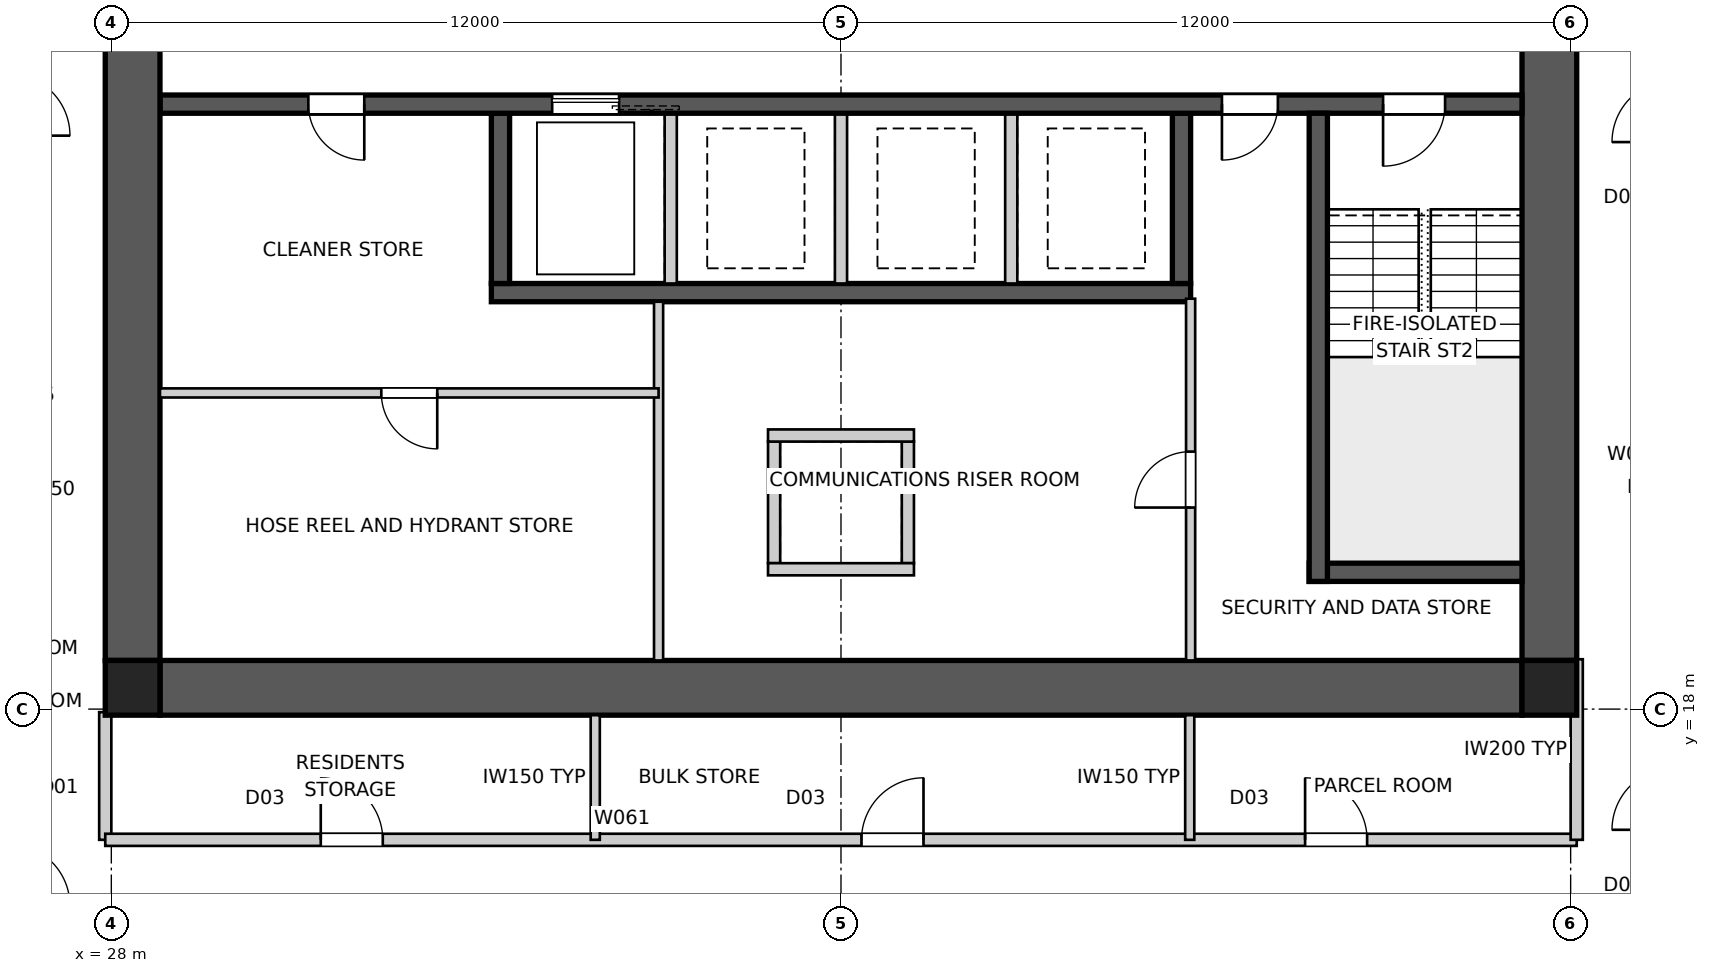
"""IFC4 building model, lengths in metres.
Left out: names, types, materials, properties, quantities, classifications, styles, units other than length and angle.
Written with IfcOpenShell. Run it as: python <this file> out.ifc"""

import sys

from ifc_helpers import new_model, si_unit, direction, frame, frame_2d, origin, origin_2d, place, context, subcontext, project, spatial, polyline, rectangle, outline, extrude, element, fill, save


model = new_model("IFC4")
c1 = context("Model", 3, precision=1e-05, world=origin(), true_north=direction((0.0, 1.0)))
c2 = subcontext(c1, "Body", "Model", "MODEL_VIEW")
j1 = project(units=[si_unit("LENGTHUNIT", "METRE"), si_unit("PLANEANGLEUNIT", "RADIAN")], contexts=[c1])
p1 = place(None, origin())
s1 = spatial("IfcSite", under=j1, at=p1, CompositionType="ELEMENT")
p2 = place(p1, origin())
s2 = spatial("IfcBuilding", under=s1, at=p2, CompositionType="ELEMENT")
p3 = place(p2, frame((0.0, 0.0, 25.2)))
s3 = spatial("IfcBuildingStorey", under=s2, at=p3, CompositionType="ELEMENT", Elevation=25.2)
p4 = place(p3, frame((51.2, 18.35, 0.0), z_axis=(0.0, 0.0, 1.0), x_axis=(-1.0, 0.0, 0.0)))
e1 = element("IfcWall", 1, at=p4, inside=s3, PredefinedType="SHEAR", context=c2, shape_type="SweptSolid", body=[
    extrude(outline(polyline([(0.0, -0.45), (22.4, -0.45), (22.4, -0.025), (22.85, -0.025), (22.85, 0.025), (22.4, 0.025), (22.4, 0.45), (0.0, 0.45), (0.0, 0.025), (-0.45, 0.025), (-0.45, -0.025), (0.0, -0.025), (0.0, -0.45)])), origin(), (0.0, 0.0, 1.0), 3.4),
])
p5 = place(p3, frame((51.65, 18.8, 0.0), z_axis=(0.0, 0.0, 1.0), x_axis=(0.0, 1.0, 0.0)))
e2 = element("IfcWall", 2, at=p5, inside=s3, PredefinedType="SHEAR", context=c2, shape_type="SweptSolid", body=[
    extrude(outline(polyline([(0.0, -0.45), (22.4, -0.45), (22.4, -0.025), (22.85, -0.025), (22.85, 0.025), (22.4, 0.025), (22.4, 0.45), (0.0, 0.45), (0.0, 0.025), (-0.45, 0.025), (-0.45, -0.025), (0.0, -0.025), (0.0, -0.45)])), origin(), (0.0, 0.0, 1.0), 3.4),
])
p6 = place(p5, frame((11.14, 0.0, 0.0)))
e3 = element("IfcOpeningElement", 3, at=p6, cuts=e2, PredefinedType="OPENING", context=c2, shape_type="SweptSolid", body=[
    extrude(rectangle(XDim=1.02, YDim=2.4, at=frame_2d((0.51, 1.2))), frame((0.0, 0.46, 0.0), z_axis=(0.0, -1.0, 0.0), x_axis=(1.0, 0.0, 0.0)), (0.0, 0.0, 1.0), 0.92),
])
p7 = place(p3, frame((28.35, 41.2, 0.0), z_axis=(0.0, 0.0, 1.0), x_axis=(0.0, -1.0, 0.0)))
e4 = element("IfcWall", 4, at=p7, inside=s3, PredefinedType="SHEAR", context=c2, shape_type="SweptSolid", body=[
    extrude(outline(polyline([(0.0, -0.45), (22.4, -0.45), (22.4, -0.025), (22.85, -0.025), (22.85, 0.025), (22.4, 0.025), (22.4, 0.45), (0.0, 0.45), (0.0, 0.025), (-0.45, 0.025), (-0.45, -0.025), (0.0, -0.025), (0.0, -0.45)])), origin(), (0.0, 0.0, 1.0), 3.4),
])
p8 = place(p7, frame((11.14, 0.0, 0.0)))
e5 = element("IfcOpeningElement", 5, at=p8, cuts=e4, PredefinedType="OPENING", context=c2, shape_type="SweptSolid", body=[
    extrude(rectangle(XDim=1.02, YDim=2.4, at=frame_2d((0.51, 1.2))), frame((0.0, 0.46, 0.0), z_axis=(0.0, -1.0, 0.0), x_axis=(1.0, 0.0, 0.0)), (0.0, 0.0, 1.0), 0.92),
])
p9 = place(p3, frame((51.2, 27.95, 0.0), z_axis=(0.0, 0.0, 1.0), x_axis=(-1.0, 0.0, 0.0)))
e6 = element("IfcWall", 6, at=p9, inside=s3, PredefinedType="SHEAR", context=c2, shape_type="SweptSolid", body=[
    extrude(rectangle(XDim=22.4, YDim=0.3, at=frame_2d((11.2, 0.0))), origin(), (0.0, 0.0, 1.0), 3.4),
])
p10 = place(p9, frame((19.04, 0.0, 0.0)))
e7 = element("IfcOpeningElement", 7, at=p10, cuts=e6, PredefinedType="OPENING", context=c2, shape_type="SweptSolid", body=[
    extrude(rectangle(XDim=0.92, YDim=2.1, at=frame_2d((0.46, 1.05))), frame((0.0, 0.16, 0.0), z_axis=(0.0, -1.0, 0.0), x_axis=(1.0, 0.0, 0.0)), (0.0, 0.0, 1.0), 0.32),
])
p11 = place(p9, frame((1.265, 0.0, 0.0)))
e8 = element("IfcOpeningElement", 8, at=p11, cuts=e6, PredefinedType="OPENING", context=c2, shape_type="SweptSolid", body=[
    extrude(rectangle(XDim=1.02, YDim=2.1, at=frame_2d((0.51, 1.05))), frame((0.0, 0.16, 0.0), z_axis=(0.0, -1.0, 0.0), x_axis=(1.0, 0.0, 0.0)), (0.0, 0.0, 1.0), 0.32),
])
p12 = place(p9, frame((4.015, 0.0, 0.0)))
e9 = element("IfcOpeningElement", 9, at=p12, cuts=e6, PredefinedType="OPENING", context=c2, shape_type="SweptSolid", body=[
    extrude(rectangle(XDim=0.92, YDim=2.1, at=frame_2d((0.46, 1.05))), frame((0.0, 0.16, 0.0), z_axis=(0.0, -1.0, 0.0), x_axis=(1.0, 0.0, 0.0)), (0.0, 0.0, 1.0), 0.32),
])
p13 = place(p9, frame((14.85, 0.0, 0.0)))
e10 = element("IfcOpeningElement", 10, at=p13, cuts=e6, PredefinedType="OPENING", context=c2, shape_type="SweptSolid", body=[
    extrude(rectangle(XDim=1.1, YDim=2.1, at=frame_2d((0.55, 1.05))), frame((0.0, 0.16, 0.0), z_axis=(0.0, -1.0, 0.0), x_axis=(1.0, 0.0, 0.0)), (0.0, 0.0, 1.0), 0.32),
])
p14 = place(p3, frame((45.75, 24.85, 0.0), z_axis=(0.0, 0.0, 1.0), x_axis=(-1.0, 0.0, 0.0)))
e11 = element("IfcWall", 11, at=p14, inside=s3, PredefinedType="SHEAR", context=c2, shape_type="SweptSolid", body=[
    extrude(rectangle(XDim=11.5, YDim=0.3, at=frame_2d((5.75, 0.0))), origin(), (0.0, 0.0, 1.0), 3.4),
])
p15 = place(p3, frame((45.6, 27.8, 0.0), z_axis=(0.0, 0.0, 1.0), x_axis=(0.0, -1.0, 0.0)))
e12 = element("IfcWall", 12, at=p15, inside=s3, PredefinedType="SHEAR", context=c2, shape_type="SweptSolid", body=[
    extrude(rectangle(XDim=2.8, YDim=0.3, at=frame_2d((1.4, 0.0))), origin(), (0.0, 0.0, 1.0), 3.4),
])
for number, where, z_axis, x_axis in (
    (13, (42.8, 27.8, 0.0), (0.0, 0.0, 1.0), (0.0, -1.0, 0.0)),
    (14, (40.0, 27.8, 0.0), (0.0, 0.0, 1.0), (0.0, -1.0, 0.0)),
    (15, (37.2, 27.8, 0.0), (0.0, 0.0, 1.0), (0.0, -1.0, 0.0)),
):
    element("IfcWall", number, at=place(p3, frame(where, z_axis=z_axis, x_axis=x_axis)), inside=s3, PredefinedType="SOLIDWALL", context=c2, shape_type="SweptSolid", body=[
        extrude(rectangle(XDim=2.8, YDim=0.2, at=frame_2d((1.4, 0.0))), origin(), (0.0, 0.0, 1.0), 3.4),
    ])
p16 = place(p3, frame((34.4, 27.8, 0.0), z_axis=(0.0, 0.0, 1.0), x_axis=(0.0, -1.0, 0.0)))
e16 = element("IfcWall", 16, at=p16, inside=s3, PredefinedType="SHEAR", context=c2, shape_type="SweptSolid", body=[
    extrude(rectangle(XDim=2.8, YDim=0.3, at=frame_2d((1.4, 0.0))), origin(), (0.0, 0.0, 1.0), 3.4),
])
p17 = place(p3, frame((47.85, 27.8, 0.0), z_axis=(0.0, 0.0, 1.0), x_axis=(0.0, -1.0, 0.0)))
e17 = element("IfcWall", 17, at=p17, inside=s3, PredefinedType="SHEAR", context=c2, shape_type="SweptSolid", body=[
    extrude(rectangle(XDim=7.7, YDim=0.3, at=frame_2d((3.85, 0.0))), origin(), (0.0, 0.0, 1.0), 3.4),
])
p18 = place(p3, frame((51.2, 20.25, 0.0), z_axis=(0.0, 0.0, 1.0), x_axis=(-1.0, 0.0, 0.0)))
e18 = element("IfcWall", 18, at=p18, inside=s3, PredefinedType="SHEAR", context=c2, shape_type="SweptSolid", body=[
    extrude(rectangle(XDim=3.5, YDim=0.3, at=frame_2d((1.75, 0.0))), origin(), (0.0, 0.0, 1.0), 3.4),
])
for number, where, z_axis, x_axis in (
    (19, (38.9, 22.4, 0.0), (0.0, 0.0, 1.0), (0.0, -1.0, 0.0)),
    (20, (41.1, 22.4, 0.0), (0.0, 0.0, 1.0), (0.0, -1.0, 0.0)),
):
    element("IfcWall", number, at=place(p3, frame(where, z_axis=z_axis, x_axis=x_axis)), inside=s3, PredefinedType="SOLIDWALL", context=c2, shape_type="SweptSolid", body=[
        extrude(rectangle(XDim=2.0, YDim=0.2, at=frame_2d((1.0, 0.0))), origin(), (0.0, 0.0, 1.0), 3.4),
    ])
for number, where, z_axis, x_axis in (
    (21, (38.8, 22.5, 0.0), (0.0, 0.0, 1.0), (1.0, 0.0, 0.0)),
    (22, (38.8, 20.3, 0.0), (0.0, 0.0, 1.0), (1.0, 0.0, 0.0)),
):
    element("IfcWall", number, at=place(p3, frame(where, z_axis=z_axis, x_axis=x_axis)), inside=s3, PredefinedType="SOLIDWALL", context=c2, shape_type="SweptSolid", body=[
        extrude(rectangle(XDim=2.4, YDim=0.2, at=frame_2d((1.2, 0.0))), origin(), (0.0, 0.0, 1.0), 3.4),
    ])
for number, where, z_axis, x_axis in (
    (23, (28.35, 18.35, 0.0), (0.0, 0.0, 1.0), (1.0, 0.0, 0.0)),
    (24, (51.65, 18.35, 0.0), (0.0, 0.0, 1.0), (1.0, 0.0, 0.0)),
):
    element("IfcColumn", number, at=place(p3, frame(where, z_axis=z_axis, x_axis=x_axis)), inside=s3, PredefinedType="COLUMN", context=c2, shape_type="SweptSolid", body=[
        extrude(rectangle(XDim=0.9, YDim=0.9, at=origin_2d()), origin(), (0.0, 0.0, 1.0), 3.4),
    ])
p19 = place(p3, frame((45.75, 18.8, 0.0), z_axis=(0.0, 0.0, 1.0), x_axis=(0.0, 1.0, 0.0)))
e25 = element("IfcWall", 25, at=p19, inside=s3, PredefinedType="SOLIDWALL", context=c2, shape_type="SweptSolid", body=[
    extrude(rectangle(XDim=5.95, YDim=0.15, at=frame_2d((2.975, 0.0))), origin(), (0.0, 0.0, 1.0), 3.25),
])
p20 = place(p19, frame((2.515, 0.0, 0.0)))
e26 = element("IfcOpeningElement", 26, at=p20, cuts=e25, PredefinedType="OPENING", context=c2, shape_type="SweptSolid", body=[
    extrude(rectangle(XDim=0.92, YDim=2.1, at=frame_2d((0.46, 1.05))), frame((0.0, 0.085, 0.0), z_axis=(0.0, -1.0, 0.0), x_axis=(1.0, 0.0, 0.0)), (0.0, 0.0, 1.0), 0.17),
])
p21 = place(p3, frame((37.0, 18.8, 0.0), z_axis=(0.0, 0.0, 1.0), x_axis=(0.0, 1.0, 0.0)))
e27 = element("IfcWall", 27, at=p21, inside=s3, PredefinedType="SOLIDWALL", context=c2, shape_type="SweptSolid", body=[
    extrude(rectangle(XDim=5.9, YDim=0.15, at=frame_2d((2.95, 0.0))), origin(), (0.0, 0.0, 1.0), 3.25),
])
p22 = place(p3, frame((37.0, 23.2, 0.0), z_axis=(0.0, 0.0, 1.0), x_axis=(-1.0, 0.0, 0.0)))
e28 = element("IfcWall", 28, at=p22, inside=s3, PredefinedType="SOLIDWALL", context=c2, shape_type="SweptSolid", body=[
    extrude(rectangle(XDim=8.2, YDim=0.15, at=frame_2d((4.1, 0.0))), origin(), (0.0, 0.0, 1.0), 3.25),
])
p23 = place(p22, frame((3.64, 0.0, 0.0)))
e29 = element("IfcOpeningElement", 29, at=p23, cuts=e28, PredefinedType="OPENING", context=c2, shape_type="SweptSolid", body=[
    extrude(rectangle(XDim=0.92, YDim=2.1, at=frame_2d((0.46, 1.05))), frame((0.0, 0.085, 0.0), z_axis=(0.0, -1.0, 0.0), x_axis=(1.0, 0.0, 0.0)), (0.0, 0.0, 1.0), 0.17),
])
p24 = place(p3, frame((27.9, 17.95, 0.0), z_axis=(0.0, 0.0, 1.0), x_axis=(0.0, -1.0, 0.0)))
e30 = element("IfcWall", 30, at=p24, inside=s3, PredefinedType="PARTITIONING", context=c2, shape_type="SweptSolid", body=[
    extrude(rectangle(XDim=2.1, YDim=0.2, at=frame_2d((1.05, 0.0))), origin(), (0.0, 0.0, 1.0), 3.25),
])
p25 = place(p3, frame((27.9, 15.85, 0.0), z_axis=(0.0, 0.0, 1.0), x_axis=(1.0, 0.0, 0.0)))
e31 = element("IfcWall", 31, at=p25, inside=s3, PredefinedType="PARTITIONING", context=c2, shape_type="SweptSolid", body=[
    extrude(rectangle(XDim=24.2, YDim=0.2, at=frame_2d((12.1, 0.0))), origin(), (0.0, 0.0, 1.0), 3.25),
])
p26 = place(p25, frame((12.437, 0.0, 0.0)))
e32 = element("IfcOpeningElement", 32, at=p26, cuts=e31, PredefinedType="OPENING", context=c2, shape_type="SweptSolid", body=[
    extrude(rectangle(XDim=1.02, YDim=2.1, at=frame_2d((0.51, 1.05))), frame((0.0, 0.11, 0.0), z_axis=(0.0, -1.0, 0.0), x_axis=(1.0, 0.0, 0.0)), (0.0, 0.0, 1.0), 0.22),
])
p27 = place(p25, frame((3.544, 0.0, 0.0)))
e33 = element("IfcOpeningElement", 33, at=p27, cuts=e31, PredefinedType="OPENING", context=c2, shape_type="SweptSolid", body=[
    extrude(rectangle(XDim=1.02, YDim=2.1, at=frame_2d((0.51, 1.05))), frame((0.0, 0.11, 0.0), z_axis=(0.0, -1.0, 0.0), x_axis=(1.0, 0.0, 0.0)), (0.0, 0.0, 1.0), 0.22),
])
p28 = place(p25, frame((19.733, 0.0, 0.0)))
e34 = element("IfcOpeningElement", 34, at=p28, cuts=e31, PredefinedType="OPENING", context=c2, shape_type="SweptSolid", body=[
    extrude(rectangle(XDim=1.02, YDim=2.1, at=frame_2d((0.51, 1.05))), frame((0.0, 0.11, 0.0), z_axis=(0.0, -1.0, 0.0), x_axis=(1.0, 0.0, 0.0)), (0.0, 0.0, 1.0), 0.22),
])
p29 = place(p3, frame((52.1, 15.85, 0.0), z_axis=(0.0, 0.0, 1.0), x_axis=(0.0, 1.0, 0.0)))
e35 = element("IfcWall", 35, at=p29, inside=s3, PredefinedType="PARTITIONING", context=c2, shape_type="SweptSolid", body=[
    extrude(rectangle(XDim=2.97, YDim=0.2, at=frame_2d((1.485, 0.0))), origin(), (0.0, 0.0, 1.0), 3.25),
])
p30 = place(p3, frame((35.958, 15.85, 0.0), z_axis=(0.0, 0.0, 1.0), x_axis=(0.0, 1.0, 0.0)))
e36 = element("IfcWall", 36, at=p30, inside=s3, PredefinedType="SOLIDWALL", context=c2, shape_type="SweptSolid", body=[
    extrude(rectangle(XDim=2.05, YDim=0.15, at=frame_2d((1.025, 0.0))), origin(), (0.0, 0.0, 1.0), 3.25),
])
p31 = place(p3, frame((45.735, 15.85, 0.0), z_axis=(0.0, 0.0, 1.0), x_axis=(0.0, 1.0, 0.0)))
e37 = element("IfcWall", 37, at=p31, inside=s3, PredefinedType="SOLIDWALL", context=c2, shape_type="SweptSolid", body=[
    extrude(rectangle(XDim=2.05, YDim=0.15, at=frame_2d((1.025, 0.0))), origin(), (0.0, 0.0, 1.0), 2.796),
])
p32 = place(p10, origin())
e38 = element("IfcDoor", 38, at=p32, inside=s3, OperationType="SINGLE_SWING_LEFT", PredefinedType="DOOR", context=c2, shape_type="SweptSolid", body=[
    extrude(rectangle(XDim=0.92, YDim=2.1, at=frame_2d((0.46, 1.05))), frame((0.0, 0.025, 0.0), z_axis=(0.0, -1.0, 0.0), x_axis=(1.0, 0.0, 0.0)), (0.0, 0.0, 1.0), 0.05),
])
fill(e7, e38)
p33 = place(p11, origin())
e39 = element("IfcDoor", 39, at=p33, inside=s3, OperationType="SINGLE_SWING_RIGHT", PredefinedType="DOOR", context=c2, shape_type="SweptSolid", body=[
    extrude(rectangle(XDim=1.02, YDim=2.1, at=frame_2d((0.51, 1.05))), frame((0.0, 0.025, 0.0), z_axis=(0.0, -1.0, 0.0), x_axis=(1.0, 0.0, 0.0)), (0.0, 0.0, 1.0), 0.05),
])
fill(e8, e39)
p34 = place(p12, origin())
e40 = element("IfcDoor", 40, at=p34, inside=s3, OperationType="SINGLE_SWING_RIGHT", PredefinedType="DOOR", context=c2, shape_type="SweptSolid", body=[
    extrude(rectangle(XDim=0.92, YDim=2.1, at=frame_2d((0.46, 1.05))), frame((0.0, 0.025, 0.0), z_axis=(0.0, -1.0, 0.0), x_axis=(1.0, 0.0, 0.0)), (0.0, 0.0, 1.0), 0.05),
])
fill(e9, e40)
p35 = place(p26, origin())
e41 = element("IfcDoor", 41, at=p35, inside=s3, OperationType="SINGLE_SWING_RIGHT", PredefinedType="DOOR", context=c2, shape_type="SweptSolid", body=[
    extrude(rectangle(XDim=1.02, YDim=2.1, at=frame_2d((0.51, 1.05))), frame((0.0, 0.025, 0.0), z_axis=(0.0, -1.0, 0.0), x_axis=(1.0, 0.0, 0.0)), (0.0, 0.0, 1.0), 0.05),
])
fill(e32, e41)
p36 = place(p27, origin())
e42 = element("IfcDoor", 42, at=p36, inside=s3, OperationType="SINGLE_SWING_LEFT", PredefinedType="DOOR", context=c2, shape_type="SweptSolid", body=[
    extrude(rectangle(XDim=1.02, YDim=2.1, at=frame_2d((0.51, 1.05))), frame((0.0, 0.025, 0.0), z_axis=(0.0, -1.0, 0.0), x_axis=(1.0, 0.0, 0.0)), (0.0, 0.0, 1.0), 0.05),
])
fill(e33, e42)
p37 = place(p28, origin())
e43 = element("IfcDoor", 43, at=p37, inside=s3, OperationType="SINGLE_SWING_LEFT", PredefinedType="DOOR", context=c2, shape_type="SweptSolid", body=[
    extrude(rectangle(XDim=1.02, YDim=2.1, at=frame_2d((0.51, 1.05))), frame((0.0, 0.025, 0.0), z_axis=(0.0, -1.0, 0.0), x_axis=(1.0, 0.0, 0.0)), (0.0, 0.0, 1.0), 0.05),
])
fill(e34, e43)
p38 = place(p23, origin())
e44 = element("IfcDoor", 44, at=p38, inside=s3, OperationType="SINGLE_SWING_LEFT", PredefinedType="DOOR", context=c2, shape_type="SweptSolid", body=[
    extrude(rectangle(XDim=0.92, YDim=2.1, at=frame_2d((0.46, 1.05))), frame((0.0, 0.025, 0.0), z_axis=(0.0, -1.0, 0.0), x_axis=(1.0, 0.0, 0.0)), (0.0, 0.0, 1.0), 0.05),
])
fill(e29, e44)
p39 = place(p20, origin())
e45 = element("IfcDoor", 45, at=p39, inside=s3, OperationType="SINGLE_SWING_LEFT", PredefinedType="DOOR", context=c2, shape_type="SweptSolid", body=[
    extrude(rectangle(XDim=0.92, YDim=2.1, at=frame_2d((0.46, 1.05))), frame((0.0, 0.025, 0.0), z_axis=(0.0, -1.0, 0.0), x_axis=(1.0, 0.0, 0.0)), (0.0, 0.0, 1.0), 0.05),
])
fill(e26, e45)
p40 = place(p13, origin())
e46 = element("IfcDoor", 46, at=p40, inside=s3, OperationType="SLIDING_TO_LEFT", PredefinedType="DOOR", context=c2, shape_type="SweptSolid", body=[
    extrude(rectangle(XDim=1.1, YDim=2.1, at=frame_2d((0.55, 1.05))), frame((0.0, 0.025, 0.0), z_axis=(0.0, -1.0, 0.0), x_axis=(1.0, 0.0, 0.0)), (0.0, 0.0, 1.0), 0.05),
])
fill(e10, e46)
save(model, sys.argv[1])
